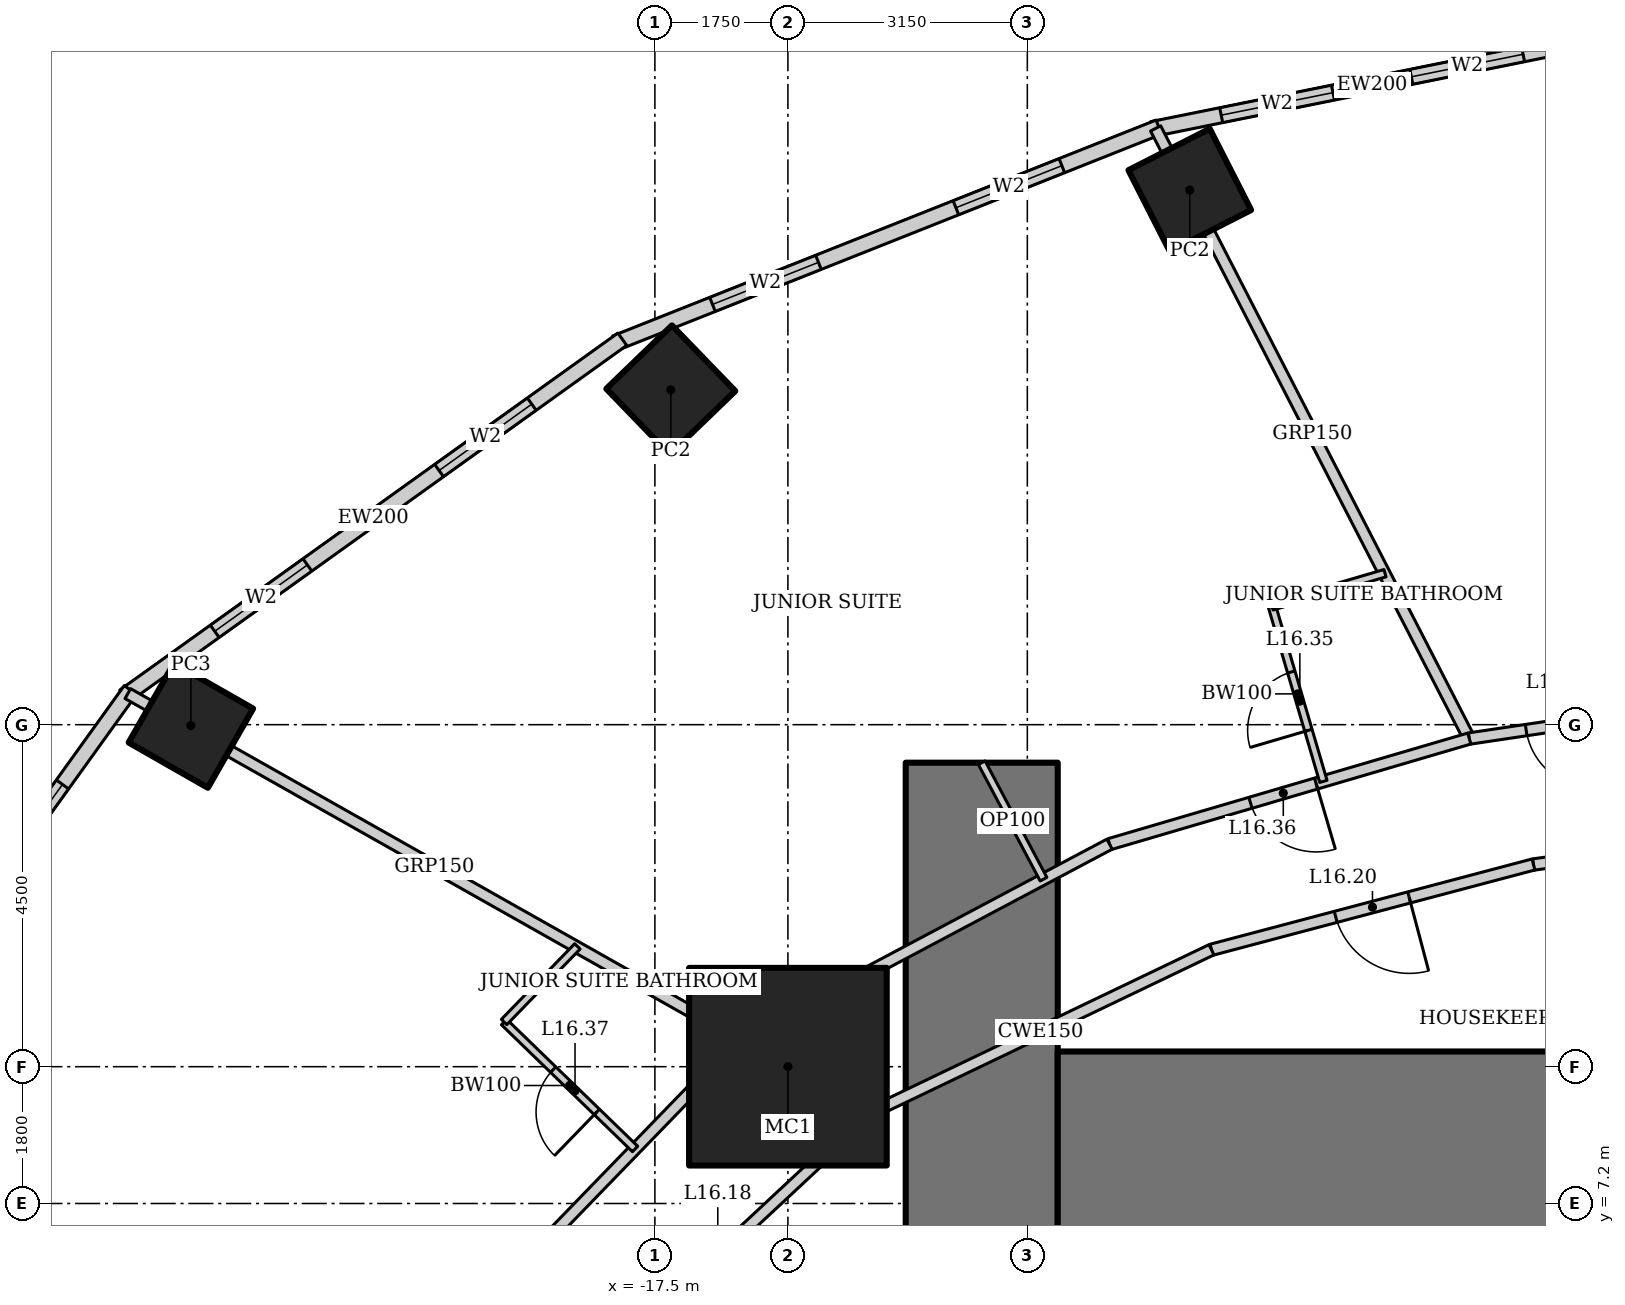
"""IFC4 building model, lengths in metres.
Left out: names, types, materials, properties, quantities, classifications, styles, units other than length and angle.
Written with IfcOpenShell. Run it as: python <this file> out.ifc"""

import sys

from ifc_helpers import new_model, si_unit, direction, frame, frame_2d, origin, origin_2d, place, context, subcontext, project, spatial, rectangle, hollow_rectangle, extrude, element, fill, save


model = new_model("IFC4")
c1 = context("Model", 3, precision=1e-05, world=origin(), true_north=direction((0.0, 1.0)))
c2 = subcontext(c1, "Body", "Model", "MODEL_VIEW")
j1 = project(units=[si_unit("LENGTHUNIT", "METRE"), si_unit("PLANEANGLEUNIT", "RADIAN")], contexts=[c1])
p1 = place(None, origin())
s1 = spatial("IfcSite", under=j1, at=p1, CompositionType="ELEMENT")
p2 = place(p1, origin())
s2 = spatial("IfcBuilding", under=s1, at=p2, CompositionType="ELEMENT")
p3 = place(p2, frame((0.0, 0.0, 73.0)))
s3 = spatial("IfcBuildingStorey", under=s2, at=p3, CompositionType="ELEMENT", Elevation=73.0)
p4 = place(p3, frame((-15.75, 9.0, 0.0), z_axis=(0.0, 0.0, 1.0), x_axis=(1.0, 0.0, 0.0)))
e1 = element("IfcColumn", 1, at=p4, inside=s3, PredefinedType="COLUMN", context=c2, shape_type="SweptSolid", body=[
    extrude(hollow_rectangle(XDim=2.6, YDim=2.6, WallThickness=0.13, at=origin_2d()), origin(), (0.0, 0.0, 1.0), 3.6),
])
for number, where, z_axis, x_axis in (
    (2, (-10.463, 20.534, 0.0), (0.0, 0.0, 1.0), (0.891, 0.454, 0.0)),
    (3, (-17.291, 17.905, 0.0), (0.0, 0.0, 1.0), (0.719, 0.695, 0.0)),
):
    element("IfcColumn", number, at=place(p3, frame(where, z_axis=z_axis, x_axis=x_axis)), inside=s3, PredefinedType="COLUMN", context=c2, shape_type="SweptSolid", body=[
        extrude(hollow_rectangle(XDim=1.2, YDim=1.2, WallThickness=0.1, at=origin_2d()), origin(), (0.0, 0.0, 1.0), 3.6),
    ])
p5 = place(p3, frame((-23.605, 13.489, 0.0), z_axis=(0.0, 0.0, 1.0), x_axis=(0.496139221777, 0.86824298017, 0.0)))
e4 = element("IfcColumn", 4, at=p5, inside=s3, PredefinedType="COLUMN", context=c2, shape_type="SweptSolid", body=[
    extrude(hollow_rectangle(XDim=1.2, YDim=1.2, WallThickness=0.12, at=origin_2d()), origin(), (0.0, 0.0, 1.0), 3.6),
])
p6 = place(p3, frame((-13.2, 13.0, 0.0), z_axis=(0.0, 0.0, 1.0), x_axis=(0.0, -1.0, 0.0)))
e5 = element("IfcWall", 5, at=p6, inside=s3, PredefinedType="SHEAR", context=c2, shape_type="SweptSolid", body=[
    extrude(rectangle(XDim=26.0, YDim=2.0, at=frame_2d((13.0, 0.0))), origin(), (0.0, 0.0, 1.0), 3.6),
])
p7 = place(p6, frame((12.1, 0.0, 0.0)))
e6 = element("IfcOpeningElement", 6, at=p7, cuts=e5, PredefinedType="OPENING", context=c2, shape_type="SweptSolid", body=[
    extrude(rectangle(XDim=1.8, YDim=2.1, at=frame_2d((0.9, 1.05))), frame((0.0, 1.01, 0.0), z_axis=(0.0, -1.0, 0.0), x_axis=(1.0, 0.0, 0.0)), (0.0, 0.0, 1.0), 2.02),
])
p8 = place(p3, frame((12.2, 8.0, 0.0), z_axis=(0.0, 0.0, 1.0), x_axis=(-1.0, 0.0, 0.0)))
e7 = element("IfcWall", 7, at=p8, inside=s3, PredefinedType="SHEAR", context=c2, shape_type="SweptSolid", body=[
    extrude(rectangle(XDim=24.4, YDim=2.4, at=frame_2d((12.2, 0.0))), origin(), (0.0, 0.0, 1.0), 3.6),
])
p9 = place(p3, frame((-5.17, 22.504, 0.0), z_axis=(0.0, 0.0, 1.0), x_axis=(-0.980251657452, -0.197754110105, 0.0)))
e8 = element("IfcWall", 8, at=p9, inside=s3, PredefinedType="SOLIDWALL", context=c2, shape_type="SweptSolid", body=[
    extrude(rectangle(XDim=5.904, YDim=0.2, at=frame_2d((2.952, 0.0))), origin(), (0.0, 0.0, 1.0), 3.45),
])
p10 = place(p9, frame((0.926, 0.0, 0.5)))
e9 = element("IfcOpeningElement", 9, at=p10, cuts=e8, PredefinedType="OPENING", context=c2, shape_type="SweptSolid", body=[
    extrude(rectangle(XDim=1.5, YDim=2.2, at=frame_2d((0.75, 1.1))), frame((0.0, 0.11, 0.0), z_axis=(0.0, -1.0, 0.0), x_axis=(1.0, 0.0, 0.0)), (0.0, 0.0, 1.0), 0.22),
])
p11 = place(p9, frame((3.478, 0.0, 0.5)))
e10 = element("IfcOpeningElement", 10, at=p11, cuts=e8, PredefinedType="OPENING", context=c2, shape_type="SweptSolid", body=[
    extrude(rectangle(XDim=1.5, YDim=2.2, at=frame_2d((0.75, 1.1))), frame((0.0, 0.11, 0.0), z_axis=(0.0, -1.0, 0.0), x_axis=(1.0, 0.0, 0.0)), (0.0, 0.0, 1.0), 0.22),
])
p12 = place(p3, frame((-10.869, 21.363, 0.0), z_axis=(0.0, 0.0, 1.0), x_axis=(-0.929358351251, -0.369178892895, 0.0)))
e11 = element("IfcWall", 11, at=p12, inside=s3, PredefinedType="SOLIDWALL", context=c2, shape_type="SweptSolid", body=[
    extrude(rectangle(XDim=7.692, YDim=0.2, at=frame_2d((3.846, 0.0))), origin(), (0.0, 0.0, 1.0), 3.45),
])
p13 = place(p12, frame((1.373, 0.0, 0.5)))
e12 = element("IfcOpeningElement", 12, at=p13, cuts=e11, PredefinedType="OPENING", context=c2, shape_type="SweptSolid", body=[
    extrude(rectangle(XDim=1.5, YDim=2.2, at=frame_2d((0.75, 1.1))), frame((0.0, 0.11, 0.0), z_axis=(0.0, -1.0, 0.0), x_axis=(1.0, 0.0, 0.0)), (0.0, 0.0, 1.0), 0.22),
])
p14 = place(p12, frame((4.819, 0.0, 0.5)))
e13 = element("IfcOpeningElement", 13, at=p14, cuts=e11, PredefinedType="OPENING", context=c2, shape_type="SweptSolid", body=[
    extrude(rectangle(XDim=1.5, YDim=2.2, at=frame_2d((0.75, 1.1))), frame((0.0, 0.11, 0.0), z_axis=(0.0, -1.0, 0.0), x_axis=(1.0, 0.0, 0.0)), (0.0, 0.0, 1.0), 0.22),
])
p15 = place(p3, frame((-17.929, 18.572, 0.0), z_axis=(0.0, 0.0, 1.0), x_axis=(-0.812791321576, -0.582554948112, 0.0)))
e14 = element("IfcWall", 14, at=p15, inside=s3, PredefinedType="SOLIDWALL", context=c2, shape_type="SweptSolid", body=[
    extrude(rectangle(XDim=8.063, YDim=0.2, at=frame_2d((4.032, 0.0))), origin(), (0.0, 0.0, 1.0), 3.45),
])
p16 = place(p15, frame((1.466, 0.0, 0.5)))
e15 = element("IfcOpeningElement", 15, at=p16, cuts=e14, PredefinedType="OPENING", context=c2, shape_type="SweptSolid", body=[
    extrude(rectangle(XDim=1.5, YDim=2.2, at=frame_2d((0.75, 1.1))), frame((0.0, 0.11, 0.0), z_axis=(0.0, -1.0, 0.0), x_axis=(1.0, 0.0, 0.0)), (0.0, 0.0, 1.0), 0.22),
])
p17 = place(p15, frame((5.097, 0.0, 0.5)))
e16 = element("IfcOpeningElement", 16, at=p17, cuts=e14, PredefinedType="OPENING", context=c2, shape_type="SweptSolid", body=[
    extrude(rectangle(XDim=1.5, YDim=2.2, at=frame_2d((0.75, 1.1))), frame((0.0, 0.11, 0.0), z_axis=(0.0, -1.0, 0.0), x_axis=(1.0, 0.0, 0.0)), (0.0, 0.0, 1.0), 0.22),
])
p18 = place(p3, frame((-24.4, 13.957, 0.0), z_axis=(0.0, 0.0, 1.0), x_axis=(-0.583937613703, -0.811798536155, 0.0)))
e17 = element("IfcWall", 17, at=p18, inside=s3, PredefinedType="SOLIDWALL", context=c2, shape_type="SweptSolid", body=[
    extrude(rectangle(XDim=8.323, YDim=0.2, at=frame_2d((4.162, 0.0))), origin(), (0.0, 0.0, 1.0), 3.45),
])
p19 = place(p18, frame((1.531, 0.0, 0.5)))
e18 = element("IfcOpeningElement", 18, at=p19, cuts=e17, PredefinedType="OPENING", context=c2, shape_type="SweptSolid", body=[
    extrude(rectangle(XDim=1.5, YDim=2.2, at=frame_2d((0.75, 1.1))), frame((0.0, 0.11, 0.0), z_axis=(0.0, -1.0, 0.0), x_axis=(1.0, 0.0, 0.0)), (0.0, 0.0, 1.0), 0.22),
])
p20 = place(p18, frame((5.292, 0.0, 0.5)))
e19 = element("IfcOpeningElement", 19, at=p20, cuts=e17, PredefinedType="OPENING", context=c2, shape_type="SweptSolid", body=[
    extrude(rectangle(XDim=1.5, YDim=2.2, at=frame_2d((0.75, 1.1))), frame((0.0, 0.11, 0.0), z_axis=(0.0, -1.0, 0.0), x_axis=(1.0, 0.0, 0.0)), (0.0, 0.0, 1.0), 0.22),
])
p21 = place(p3, frame((-10.912, 21.346, 0.0), z_axis=(0.0, 0.0, 1.0), x_axis=(0.457117602022, -0.889406261458, 0.0)))
e20 = element("IfcWall", 20, at=p21, inside=s3, PredefinedType="PARTITIONING", context=c2, shape_type="SweptSolid", body=[
    extrude(rectangle(XDim=9.027, YDim=0.15, at=frame_2d((4.513, 0.0))), origin(), (0.0, 0.0, 1.0), 2.528),
])
p22 = place(p3, frame((-24.435, 13.909, 0.0), z_axis=(0.0, 0.0, 1.0), x_axis=(0.870744406136, -0.491735883563, 0.0)))
e21 = element("IfcWall", 21, at=p22, inside=s3, PredefinedType="PARTITIONING", context=c2, shape_type="SweptSolid", body=[
    extrude(rectangle(XDim=9.263, YDim=0.15, at=frame_2d((4.631, 0.0))), origin(), (0.0, 0.0, 1.0), 2.693),
])
p23 = place(p3, frame((-3.198, 13.851, 0.0), z_axis=(0.0, 0.0, 1.0), x_axis=(-0.989107488999, -0.14719502439, 0.0)))
e22 = element("IfcWall", 22, at=p23, inside=s3, PredefinedType="PARTITIONING", context=c2, shape_type="SweptSolid", body=[
    extrude(rectangle(XDim=3.627, YDim=0.15, at=frame_2d((1.814, 0.0))), origin(), (0.0, 0.0, 1.0), 3.45),
])
p24 = place(p23, frame((1.97, 0.0, 0.0)))
e23 = element("IfcOpeningElement", 23, at=p24, cuts=e22, PredefinedType="OPENING", context=c2, shape_type="SweptSolid", body=[
    extrude(rectangle(XDim=0.9, YDim=2.1, at=frame_2d((0.45, 1.05))), frame((0.0, 0.085, 0.0), z_axis=(0.0, -1.0, 0.0), x_axis=(1.0, 0.0, 0.0)), (0.0, 0.0, 1.0), 0.17),
])
p25 = place(p3, frame((-6.786, 13.317, 0.0), z_axis=(0.0, 0.0, 1.0), x_axis=(-0.959496227294, -0.281721475589, 0.0)))
e24 = element("IfcWall", 24, at=p25, inside=s3, PredefinedType="PARTITIONING", context=c2, shape_type="SweptSolid", body=[
    extrude(rectangle(XDim=4.933, YDim=0.15, at=frame_2d((2.466, 0.0))), origin(), (0.0, 0.0, 1.0), 3.45),
])
p26 = place(p25, frame((2.1, 0.0, 0.0)))
e25 = element("IfcOpeningElement", 25, at=p26, cuts=e24, PredefinedType="OPENING", context=c2, shape_type="SweptSolid", body=[
    extrude(rectangle(XDim=0.9, YDim=2.1, at=frame_2d((0.45, 1.05))), frame((0.0, 0.085, 0.0), z_axis=(0.0, -1.0, 0.0), x_axis=(1.0, 0.0, 0.0)), (0.0, 0.0, 1.0), 0.17),
])
p27 = place(p3, frame((-11.519, 11.928, 0.0), z_axis=(0.0, 0.0, 1.0), x_axis=(-0.883334368785, -0.468743419071, 0.0)))
e26 = element("IfcWall", 26, at=p27, inside=s3, PredefinedType="PARTITIONING", context=c2, shape_type="SweptSolid", body=[
    extrude(rectangle(XDim=5.491, YDim=0.15, at=frame_2d((2.746, 0.0))), origin(), (0.0, 0.0, 1.0), 3.45),
])
p28 = place(p3, frame((-16.369, 9.354, 0.0), z_axis=(0.0, 0.0, 1.0), x_axis=(-0.695871090686, -0.71816671125, 0.0)))
e27 = element("IfcWall", 27, at=p28, inside=s3, PredefinedType="PARTITIONING", context=c2, shape_type="SweptSolid", body=[
    extrude(rectangle(XDim=5.913, YDim=0.15, at=frame_2d((2.957, 0.0))), origin(), (0.0, 0.0, 1.0), 3.45),
])
p29 = place(p3, frame((-2.79, 12.083, 0.0), z_axis=(0.0, 0.0, 1.0), x_axis=(-0.991129053928, -0.13290296633, 0.0)))
e28 = element("IfcWall", 28, at=p29, inside=s3, PredefinedType="PARTITIONING", context=c2, shape_type="SweptSolid", body=[
    extrude(rectangle(XDim=3.18, YDim=0.15, at=frame_2d((1.59, 0.0))), origin(), (0.0, 0.0, 1.0), 3.45),
])
p30 = place(p29, frame((0.1, 0.0, 0.0)))
e29 = element("IfcOpeningElement", 29, at=p30, cuts=e28, PredefinedType="OPENING", context=c2, shape_type="SweptSolid", body=[
    extrude(rectangle(XDim=1.0, YDim=2.1, at=frame_2d((0.5, 1.05))), frame((0.0, 0.085, 0.0), z_axis=(0.0, -1.0, 0.0), x_axis=(1.0, 0.0, 0.0)), (0.0, 0.0, 1.0), 0.17),
])
p31 = place(p3, frame((-5.941, 11.66, 0.0), z_axis=(0.0, 0.0, 1.0), x_axis=(-0.966672790407, -0.256015070428, 0.0)))
e30 = element("IfcWall", 30, at=p31, inside=s3, PredefinedType="PARTITIONING", context=c2, shape_type="SweptSolid", body=[
    extrude(rectangle(XDim=4.382, YDim=0.15, at=frame_2d((2.191, 0.0))), origin(), (0.0, 0.0, 1.0), 3.45),
])
p32 = place(p31, frame((1.691, 0.0, 0.0)))
e31 = element("IfcOpeningElement", 31, at=p32, cuts=e30, PredefinedType="OPENING", context=c2, shape_type="SweptSolid", body=[
    extrude(rectangle(XDim=1.0, YDim=2.1, at=frame_2d((0.5, 1.05))), frame((0.0, 0.085, 0.0), z_axis=(0.0, -1.0, 0.0), x_axis=(1.0, 0.0, 0.0)), (0.0, 0.0, 1.0), 0.17),
])
p33 = place(p3, frame((-10.177, 10.539, 0.0), z_axis=(0.0, 0.0, 1.0), x_axis=(-0.901869692799, -0.43200816799, 0.0)))
e32 = element("IfcWall", 32, at=p33, inside=s3, PredefinedType="PARTITIONING", context=c2, shape_type="SweptSolid", body=[
    extrude(rectangle(XDim=4.986, YDim=0.15, at=frame_2d((2.493, 0.0))), origin(), (0.0, 0.0, 1.0), 3.45),
])
p34 = place(p3, frame((-14.673, 8.385, 0.0), z_axis=(0.0, 0.0, 1.0), x_axis=(-0.731260145007, -0.682098673452, 0.0)))
e33 = element("IfcWall", 33, at=p34, inside=s3, PredefinedType="PARTITIONING", context=c2, shape_type="SweptSolid", body=[
    extrude(rectangle(XDim=5.468, YDim=0.15, at=frame_2d((2.734, 0.0))), origin(), (0.0, 0.0, 1.0), 3.45),
])
p35 = place(p34, frame((2.234, 0.0, 0.0)))
e34 = element("IfcOpeningElement", 34, at=p35, cuts=e33, PredefinedType="OPENING", context=c2, shape_type="SweptSolid", body=[
    extrude(rectangle(XDim=1.0, YDim=2.1, at=frame_2d((0.5, 1.05))), frame((0.0, 0.085, 0.0), z_axis=(0.0, -1.0, 0.0), x_axis=(1.0, 0.0, 0.0)), (0.0, 0.0, 1.0), 0.17),
])
p36 = place(p3, frame((-8.705, 12.754, 0.0), z_axis=(0.0, 0.0, 1.0), x_axis=(-0.281659633817, 0.959514382736, 0.0)))
e35 = element("IfcWall", 35, at=p36, inside=s3, PredefinedType="PARTITIONING", context=c2, shape_type="SweptSolid", body=[
    extrude(rectangle(XDim=2.4, YDim=0.1, at=frame_2d((1.2, 0.0))), origin(), (0.0, 0.0, 1.0), 3.45),
])
p37 = place(p36, frame((0.7, 0.0, 0.0)))
e36 = element("IfcOpeningElement", 36, at=p37, cuts=e35, PredefinedType="OPENING", context=c2, shape_type="SweptSolid", body=[
    extrude(rectangle(XDim=0.8, YDim=2.1, at=frame_2d((0.4, 1.05))), frame((0.0, 0.06, 0.0), z_axis=(0.0, -1.0, 0.0), x_axis=(1.0, 0.0, 0.0)), (0.0, 0.0, 1.0), 0.12),
])
p38 = place(p3, frame((-9.381, 15.057, 0.0), z_axis=(0.0, 0.0, 1.0), x_axis=(0.959518451093, 0.281645773999, 0.0)))
e37 = element("IfcWall", 37, at=p38, inside=s3, PredefinedType="PARTITIONING", context=c2, shape_type="SweptSolid", body=[
    extrude(rectangle(XDim=1.549, YDim=0.1, at=frame_2d((0.774, 0.0))), origin(), (0.0, 0.0, 1.0), 3.45),
])
p39 = place(p3, frame((-17.761, 7.917, 0.0), z_axis=(0.0, 0.0, 1.0), x_axis=(-0.718157610206, 0.695880483204, 0.0)))
e38 = element("IfcWall", 38, at=p39, inside=s3, PredefinedType="PARTITIONING", context=c2, shape_type="SweptSolid", body=[
    extrude(rectangle(XDim=2.4, YDim=0.1, at=frame_2d((1.2, 0.0))), origin(), (0.0, 0.0, 1.0), 3.45),
])
p40 = place(p39, frame((0.7, 0.0, 0.0)))
e39 = element("IfcOpeningElement", 39, at=p40, cuts=e38, PredefinedType="OPENING", context=c2, shape_type="SweptSolid", body=[
    extrude(rectangle(XDim=0.8, YDim=2.1, at=frame_2d((0.4, 1.05))), frame((0.0, 0.06, 0.0), z_axis=(0.0, -1.0, 0.0), x_axis=(1.0, 0.0, 0.0)), (0.0, 0.0, 1.0), 0.12),
])
p41 = place(p3, frame((-19.484, 9.588, 0.0), z_axis=(0.0, 0.0, 1.0), x_axis=(0.695920174922, 0.718119147591, 0.0)))
e40 = element("IfcWall", 40, at=p41, inside=s3, PredefinedType="PARTITIONING", context=c2, shape_type="SweptSolid", body=[
    extrude(rectangle(XDim=1.386, YDim=0.1, at=frame_2d((0.693, 0.0))), origin(), (0.0, 0.0, 1.0), 3.45),
])
p42 = place(p3, frame((-13.2, 13.0, 0.0), z_axis=(0.0, 0.0, 1.0), x_axis=(0.46874717052, -0.88333237806, 0.0)))
e41 = element("IfcWall", 41, at=p42, inside=s3, PredefinedType="PARTITIONING", context=c2, shape_type="SweptSolid", body=[
    extrude(rectangle(XDim=1.735, YDim=0.1, at=frame_2d((0.868, 0.0))), origin(), (0.0, 0.0, 1.0), 3.45),
])
p43 = place(p10, origin())
e42 = element("IfcWindow", 42, at=p43, inside=s3, PartitioningType="SINGLE_PANEL", PredefinedType="WINDOW", context=c2, shape_type="SweptSolid", body=[
    extrude(rectangle(XDim=1.5, YDim=2.2, at=frame_2d((0.75, 1.1))), frame((0.0, 0.03, 0.0), z_axis=(0.0, -1.0, 0.0), x_axis=(1.0, 0.0, 0.0)), (0.0, 0.0, 1.0), 0.06),
])
fill(e9, e42)
p44 = place(p11, origin())
e43 = element("IfcWindow", 43, at=p44, inside=s3, PartitioningType="SINGLE_PANEL", PredefinedType="WINDOW", context=c2, shape_type="SweptSolid", body=[
    extrude(rectangle(XDim=1.5, YDim=2.2, at=frame_2d((0.75, 1.1))), frame((0.0, 0.03, 0.0), z_axis=(0.0, -1.0, 0.0), x_axis=(1.0, 0.0, 0.0)), (0.0, 0.0, 1.0), 0.06),
])
fill(e10, e43)
p45 = place(p13, origin())
e44 = element("IfcWindow", 44, at=p45, inside=s3, PartitioningType="SINGLE_PANEL", PredefinedType="WINDOW", context=c2, shape_type="SweptSolid", body=[
    extrude(rectangle(XDim=1.5, YDim=2.2, at=frame_2d((0.75, 1.1))), frame((0.0, 0.03, 0.0), z_axis=(0.0, -1.0, 0.0), x_axis=(1.0, 0.0, 0.0)), (0.0, 0.0, 1.0), 0.06),
])
fill(e12, e44)
p46 = place(p14, origin())
e45 = element("IfcWindow", 45, at=p46, inside=s3, PartitioningType="SINGLE_PANEL", PredefinedType="WINDOW", context=c2, shape_type="SweptSolid", body=[
    extrude(rectangle(XDim=1.5, YDim=2.2, at=frame_2d((0.75, 1.1))), frame((0.0, 0.03, 0.0), z_axis=(0.0, -1.0, 0.0), x_axis=(1.0, 0.0, 0.0)), (0.0, 0.0, 1.0), 0.06),
])
fill(e13, e45)
p47 = place(p16, origin())
e46 = element("IfcWindow", 46, at=p47, inside=s3, PartitioningType="SINGLE_PANEL", PredefinedType="WINDOW", context=c2, shape_type="SweptSolid", body=[
    extrude(rectangle(XDim=1.5, YDim=2.2, at=frame_2d((0.75, 1.1))), frame((0.0, 0.03, 0.0), z_axis=(0.0, -1.0, 0.0), x_axis=(1.0, 0.0, 0.0)), (0.0, 0.0, 1.0), 0.06),
])
fill(e15, e46)
p48 = place(p17, origin())
e47 = element("IfcWindow", 47, at=p48, inside=s3, PartitioningType="SINGLE_PANEL", PredefinedType="WINDOW", context=c2, shape_type="SweptSolid", body=[
    extrude(rectangle(XDim=1.5, YDim=2.2, at=frame_2d((0.75, 1.1))), frame((0.0, 0.03, 0.0), z_axis=(0.0, -1.0, 0.0), x_axis=(1.0, 0.0, 0.0)), (0.0, 0.0, 1.0), 0.06),
])
fill(e16, e47)
p49 = place(p19, origin())
e48 = element("IfcWindow", 48, at=p49, inside=s3, PartitioningType="SINGLE_PANEL", PredefinedType="WINDOW", context=c2, shape_type="SweptSolid", body=[
    extrude(rectangle(XDim=1.5, YDim=2.2, at=frame_2d((0.75, 1.1))), frame((0.0, 0.03, 0.0), z_axis=(0.0, -1.0, 0.0), x_axis=(1.0, 0.0, 0.0)), (0.0, 0.0, 1.0), 0.06),
])
fill(e18, e48)
p50 = place(p32, origin())
e49 = element("IfcDoor", 49, at=p50, inside=s3, OperationType="SINGLE_SWING_LEFT", PredefinedType="DOOR", context=c2, shape_type="SweptSolid", body=[
    extrude(rectangle(XDim=1.0, YDim=2.1, at=frame_2d((0.5, 1.05))), frame((0.0, 0.025, 0.0), z_axis=(0.0, -1.0, 0.0), x_axis=(1.0, 0.0, 0.0)), (0.0, 0.0, 1.0), 0.05),
])
fill(e31, e49)
p51 = place(p24, origin())
e50 = element("IfcDoor", 50, at=p51, inside=s3, OperationType="SINGLE_SWING_LEFT", PredefinedType="DOOR", context=c2, shape_type="SweptSolid", body=[
    extrude(rectangle(XDim=0.9, YDim=2.1, at=frame_2d((0.45, 1.05))), frame((0.0, 0.025, 0.0), z_axis=(0.0, -1.0, 0.0), x_axis=(1.0, 0.0, 0.0)), (0.0, 0.0, 1.0), 0.05),
])
fill(e23, e50)
p52 = place(p37, origin())
e51 = element("IfcDoor", 51, at=p52, inside=s3, OperationType="SINGLE_SWING_LEFT", PredefinedType="DOOR", context=c2, shape_type="SweptSolid", body=[
    extrude(rectangle(XDim=0.8, YDim=2.1, at=frame_2d((0.4, 1.05))), frame((0.0, 0.025, 0.0), z_axis=(0.0, -1.0, 0.0), x_axis=(1.0, 0.0, 0.0)), (0.0, 0.0, 1.0), 0.05),
])
fill(e36, e51)
p53 = place(p26, origin())
e52 = element("IfcDoor", 52, at=p53, inside=s3, OperationType="SINGLE_SWING_LEFT", PredefinedType="DOOR", context=c2, shape_type="SweptSolid", body=[
    extrude(rectangle(XDim=0.9, YDim=2.1, at=frame_2d((0.45, 1.05))), frame((0.0, 0.025, 0.0), z_axis=(0.0, -1.0, 0.0), x_axis=(1.0, 0.0, 0.0)), (0.0, 0.0, 1.0), 0.05),
])
fill(e25, e52)
p54 = place(p40, origin())
e53 = element("IfcDoor", 53, at=p54, inside=s3, OperationType="SINGLE_SWING_LEFT", PredefinedType="DOOR", context=c2, shape_type="SweptSolid", body=[
    extrude(rectangle(XDim=0.8, YDim=2.1, at=frame_2d((0.4, 1.05))), frame((0.0, 0.025, 0.0), z_axis=(0.0, -1.0, 0.0), x_axis=(1.0, 0.0, 0.0)), (0.0, 0.0, 1.0), 0.05),
])
fill(e39, e53)
save(model, sys.argv[1])
